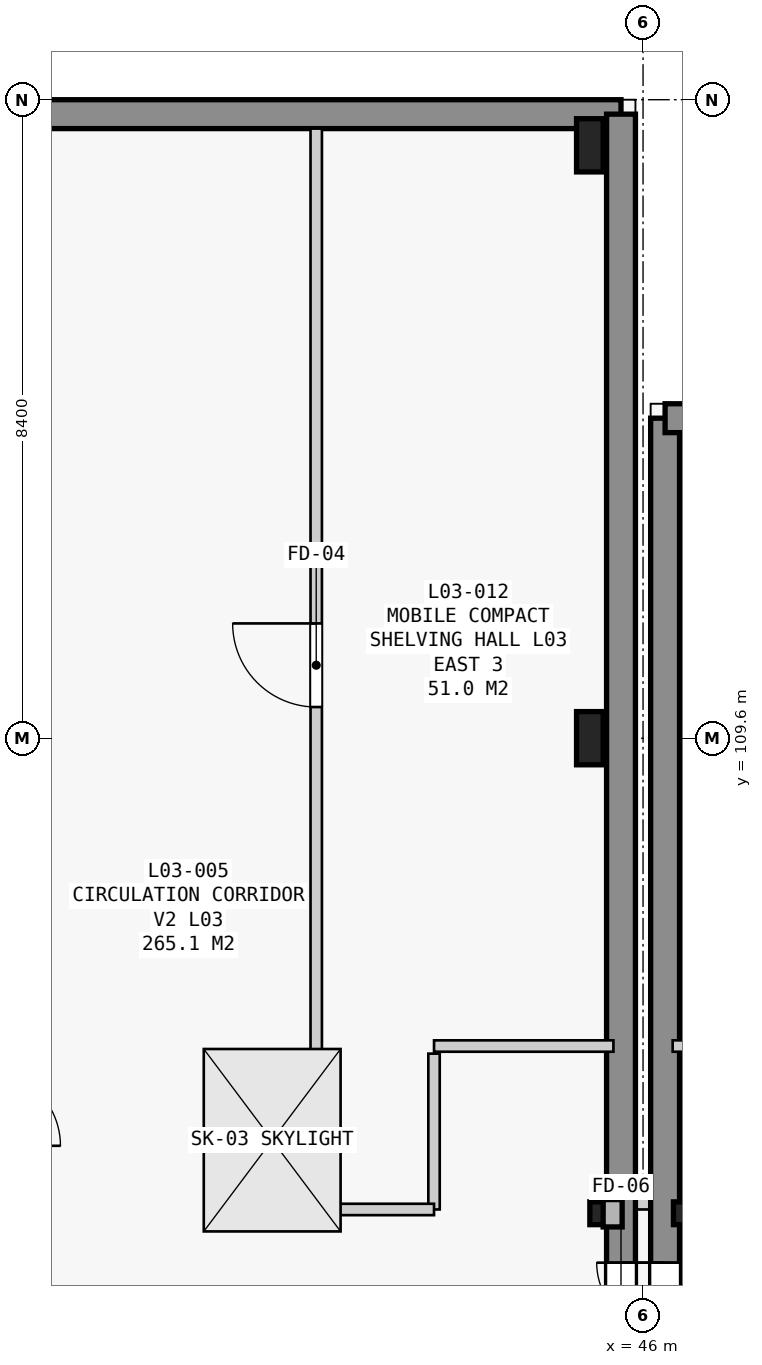
"""IFC4 building model, lengths in metres.
Left out: names, types, materials, properties, quantities, classifications, styles, units other than length and angle.
Written with IfcOpenShell. Run it as: python <this file> out.ifc"""

import sys

from ifc_helpers import new_model, si_unit, direction, frame, frame_2d, origin, origin_2d, place, context, subcontext, project, spatial, rectangle, i_section, extrude, element, fill, save


model = new_model("IFC4")
c1 = context("Model", 3, precision=1e-05, world=origin(), true_north=direction((0.0, 1.0)))
c2 = subcontext(c1, "Body", "Model", "MODEL_VIEW")
j1 = project(units=[si_unit("LENGTHUNIT", "METRE"), si_unit("PLANEANGLEUNIT", "RADIAN")], contexts=[c1])
p1 = place(None, origin())
s1 = spatial("IfcSite", under=j1, at=p1, CompositionType="ELEMENT")
p2 = place(p1, origin())
s2 = spatial("IfcBuilding", under=s1, at=p2, CompositionType="ELEMENT")
p3 = place(p2, frame((0.0, 0.0, 13.8)))
s3 = spatial("IfcBuildingStorey", under=s2, at=p3, CompositionType="ELEMENT", Elevation=13.8)
for number, where, z_axis, x_axis in (
    (1, (45.3, 109.6, 0.0), (0.0, 0.0, 1.0), (1.0, 0.0, 0.0)),
    (2, (45.3, 117.4, 0.0), (0.0, 0.0, 1.0), (1.0, 0.0, 0.0)),
):
    element("IfcColumn", number, at=place(p3, frame(where, z_axis=z_axis, x_axis=x_axis)), inside=s3, PredefinedType="COLUMN", context=c2, shape_type="SweptSolid", body=[
        extrude(rectangle(XDim=0.35, YDim=0.7, at=origin_2d()), origin(), (0.0, 0.0, 1.0), 4.5),
    ])
for number, where, z_axis, x_axis in (
    (3, (45.45, 103.35, 0.0), (0.0, 0.0, 1.0), (1.0, 0.0, 0.0)),
    (4, (46.55, 103.35, 0.0), (0.0, 0.0, 1.0), (1.0, 0.0, 0.0)),
):
    element("IfcColumn", number, at=place(p3, frame(where, z_axis=z_axis, x_axis=x_axis)), inside=s3, PredefinedType="COLUMN", context=c2, shape_type="SweptSolid", body=[
        extrude(i_section(OverallWidth=0.3, OverallDepth=0.3, WebThickness=0.011, FlangeThickness=0.019, FilletRadius=0.027, at=origin_2d()), origin(), (0.0, 0.0, 1.0), 4.065),
    ])
p4 = place(p3, frame((45.9, 103.5, 0.0), z_axis=(0.0, 0.0, 1.0), x_axis=(1.0, 0.0, 0.0)))
e5 = element("IfcWall", 5, at=p4, inside=s3, PredefinedType="STANDARD", context=c2, shape_type="SweptSolid", body=[
    extrude(rectangle(XDim=0.2, YDim=0.2, at=frame_2d((0.1, 0.0))), origin(), (0.0, 0.0, 1.0), 4.24),
])
p5 = place(p3, frame((12.59, 117.81, 0.0), z_axis=(0.0, 0.0, 1.0), x_axis=(1.0, 0.0, 0.0)))
e6 = element("IfcWall", 6, at=p5, inside=s3, PredefinedType="STANDARD", context=c2, shape_type="SweptSolid", body=[
    extrude(rectangle(XDim=33.12, YDim=0.38, at=frame_2d((16.56, 0.0))), origin(), (0.0, 0.0, 1.0), 4.18),
])
p6 = place(p3, frame((45.71, 117.81, 0.0), z_axis=(0.0, 0.0, 1.0), x_axis=(0.0, -1.0, 0.0)))
e7 = element("IfcWall", 7, at=p6, inside=s3, PredefinedType="STANDARD", context=c2, shape_type="SweptSolid", body=[
    extrude(rectangle(XDim=27.22, YDim=0.38, at=frame_2d((13.61, 0.0))), origin(), (0.0, 0.0, 1.0), 4.24),
])
p7 = place(p6, frame((15.11, 0.0, 0.0)))
e8 = element("IfcOpeningElement", 8, at=p7, cuts=e7, PredefinedType="OPENING", context=c2, shape_type="SweptSolid", body=[
    extrude(rectangle(XDim=1.8, YDim=2.2, at=frame_2d((0.9, 1.1))), frame((0.0, 0.2, 0.0), z_axis=(0.0, -1.0, 0.0), x_axis=(1.0, 0.0, 0.0)), (0.0, 0.0, 1.0), 0.4),
])
p8 = place(p3, frame((46.29, 76.29, 0.0), z_axis=(0.0, 0.0, 1.0), x_axis=(0.0, 1.0, 0.0)))
e9 = element("IfcWall", 9, at=p8, inside=s3, PredefinedType="STANDARD", context=c2, shape_type="SweptSolid", body=[
    extrude(rectangle(XDim=37.52, YDim=0.38, at=frame_2d((18.76, 0.0))), origin(), (0.0, 0.0, 1.0), 4.22),
])
p9 = place(p8, frame((24.61, 0.0, 0.0)))
e10 = element("IfcOpeningElement", 10, at=p9, cuts=e9, PredefinedType="OPENING", context=c2, shape_type="SweptSolid", body=[
    extrude(rectangle(XDim=1.8, YDim=2.2, at=frame_2d((0.9, 1.1))), frame((0.0, 0.2, 0.0), z_axis=(0.0, -1.0, 0.0), x_axis=(1.0, 0.0, 0.0)), (0.0, 0.0, 1.0), 0.4),
])
p10 = place(p3, frame((46.29, 113.81, 0.0), z_axis=(0.0, 0.0, 1.0), x_axis=(1.0, 0.0, 0.0)))
e11 = element("IfcWall", 11, at=p10, inside=s3, PredefinedType="STANDARD", context=c2, shape_type="SweptSolid", body=[
    extrude(rectangle(XDim=78.32, YDim=0.38, at=frame_2d((39.16, 0.0))), origin(), (0.0, 0.0, 1.0), 4.22),
])
p11 = place(p10, frame((23.329, 0.0, 1.05)))
e12 = element("IfcOpeningElement", 12, at=p11, cuts=e11, PredefinedType="OPENING", context=c2, shape_type="SweptSolid", body=[
    extrude(rectangle(XDim=1.8, YDim=2.5, at=frame_2d((0.9, 1.25))), frame((0.0, 0.2, 0.0), z_axis=(0.0, -1.0, 0.0), x_axis=(1.0, 0.0, 0.0)), (0.0, 0.0, 1.0), 0.4),
])
p12 = place(p10, frame((50.491, 0.0, 1.65)))
e13 = element("IfcOpeningElement", 13, at=p12, cuts=e11, PredefinedType="OPENING", context=c2, shape_type="SweptSolid", body=[
    extrude(rectangle(XDim=2.4, YDim=1.8, at=frame_2d((1.2, 0.9))), frame((0.0, 0.2, 0.0), z_axis=(0.0, -1.0, 0.0), x_axis=(1.0, 0.0, 0.0)), (0.0, 0.0, 1.0), 0.4),
])
p13 = place(p3, frame((45.61, 105.55, 0.0), z_axis=(0.0, 0.0, 1.0), x_axis=(-1.0, 0.0, 0.0)))
e14 = element("IfcWall", 14, at=p13, inside=s3, PredefinedType="PARTITIONING", context=c2, shape_type="SweptSolid", body=[
    extrude(rectangle(XDim=2.36, YDim=0.15, at=frame_2d((1.18, 0.0))), origin(), (0.0, 0.0, 1.0), 3.52),
])
p14 = place(p3, frame((43.25, 105.45, 0.0), z_axis=(0.0, 0.0, 1.0), x_axis=(0.0, -1.0, 0.0)))
e15 = element("IfcWall", 15, at=p14, inside=s3, PredefinedType="PARTITIONING", context=c2, shape_type="SweptSolid", body=[
    extrude(rectangle(XDim=2.05, YDim=0.15, at=frame_2d((1.025, 0.0))), origin(), (0.0, 0.0, 1.0), 4.18),
])
p15 = place(p3, frame((43.25, 103.4, 0.0), z_axis=(0.0, 0.0, 1.0), x_axis=(-1.0, 0.0, 0.0)))
e16 = element("IfcWall", 16, at=p15, inside=s3, PredefinedType="PARTITIONING", context=c2, shape_type="SweptSolid", body=[
    extrude(rectangle(XDim=1.55, YDim=0.15, at=frame_2d((0.775, 0.0))), origin(), (0.0, 0.0, 1.0), 4.18),
])
p16 = place(p3, frame((41.7, 103.5, 0.0), z_axis=(0.0, 0.0, 1.0), x_axis=(0.0, 1.0, 0.0)))
e17 = element("IfcWall", 17, at=p16, inside=s3, PredefinedType="PARTITIONING", context=c2, shape_type="SweptSolid", body=[
    extrude(rectangle(XDim=14.12, YDim=0.15, at=frame_2d((7.06, 0.0))), origin(), (0.0, 0.0, 1.0), 3.37),
])
p17 = place(p16, frame((6.51, 0.0, 0.0)))
e18 = element("IfcOpeningElement", 18, at=p17, cuts=e17, PredefinedType="OPENING", context=c2, shape_type="SweptSolid", body=[
    extrude(rectangle(XDim=1.1, YDim=2.15, at=frame_2d((0.55, 1.075))), frame((0.0, 0.085, 0.0), z_axis=(0.0, -1.0, 0.0), x_axis=(1.0, 0.0, 0.0)), (0.0, 0.0, 1.0), 0.17),
])
p18 = place(p3, frame((48.65, 105.55, 0.0), z_axis=(0.0, 0.0, 1.0), x_axis=(-1.0, 0.0, 0.0)))
e19 = element("IfcWall", 19, at=p18, inside=s3, PredefinedType="PARTITIONING", context=c2, shape_type="SweptSolid", body=[
    extrude(rectangle(XDim=2.26, YDim=0.15, at=frame_2d((1.13, 0.0))), origin(), (0.0, 0.0, 1.0), 3.5),
])
p19 = place(p7, origin())
e20 = element("IfcDoor", 20, at=p19, inside=s3, OperationType="DOUBLE_DOOR_SINGLE_SWING", PredefinedType="DOOR", context=c2, shape_type="SweptSolid", body=[
    extrude(rectangle(XDim=1.8, YDim=2.2, at=frame_2d((0.9, 1.1))), frame((0.0, 0.025, 0.0), z_axis=(0.0, -1.0, 0.0), x_axis=(1.0, 0.0, 0.0)), (0.0, 0.0, 1.0), 0.05),
])
fill(e8, e20)
p20 = place(p9, origin())
e21 = element("IfcDoor", 21, at=p20, inside=s3, OperationType="DOUBLE_DOOR_SINGLE_SWING", PredefinedType="DOOR", context=c2, shape_type="SweptSolid", body=[
    extrude(rectangle(XDim=1.8, YDim=2.2, at=frame_2d((0.9, 1.1))), frame((0.0, 0.025, 0.0), z_axis=(0.0, -1.0, 0.0), x_axis=(1.0, 0.0, 0.0)), (0.0, 0.0, 1.0), 0.05),
])
fill(e10, e21)
p21 = place(p2, frame((0.0, 0.0, 26.7)))
p22 = place(p21, frame((0.0, 0.0, -8.66)))
p23 = place(p22, frame((41.121, 104.311, 0.0)))
p24 = place(p23, frame((0.0, 0.0, 0.21)))
e22 = element("IfcWindow", 22, at=p24, inside=s3, PartitioningType="SINGLE_PANEL", PredefinedType="SKYLIGHT", context=c2, shape_type="SweptSolid", body=[
    extrude(rectangle(XDim=1.8, YDim=2.4, at=origin_2d()), origin(), (0.0, 0.0, 1.0), 0.05),
])
p25 = place(p17, origin())
e23 = element("IfcDoor", 23, at=p25, inside=s3, OperationType="SINGLE_SWING_RIGHT", PredefinedType="DOOR", context=c2, shape_type="SweptSolid", body=[
    extrude(rectangle(XDim=1.1, YDim=2.15, at=frame_2d((0.55, 1.075))), frame((0.0, 0.025, 0.0), z_axis=(0.0, -1.0, 0.0), x_axis=(1.0, 0.0, 0.0)), (0.0, 0.0, 1.0), 0.05),
])
fill(e18, e23)
save(model, sys.argv[1])
